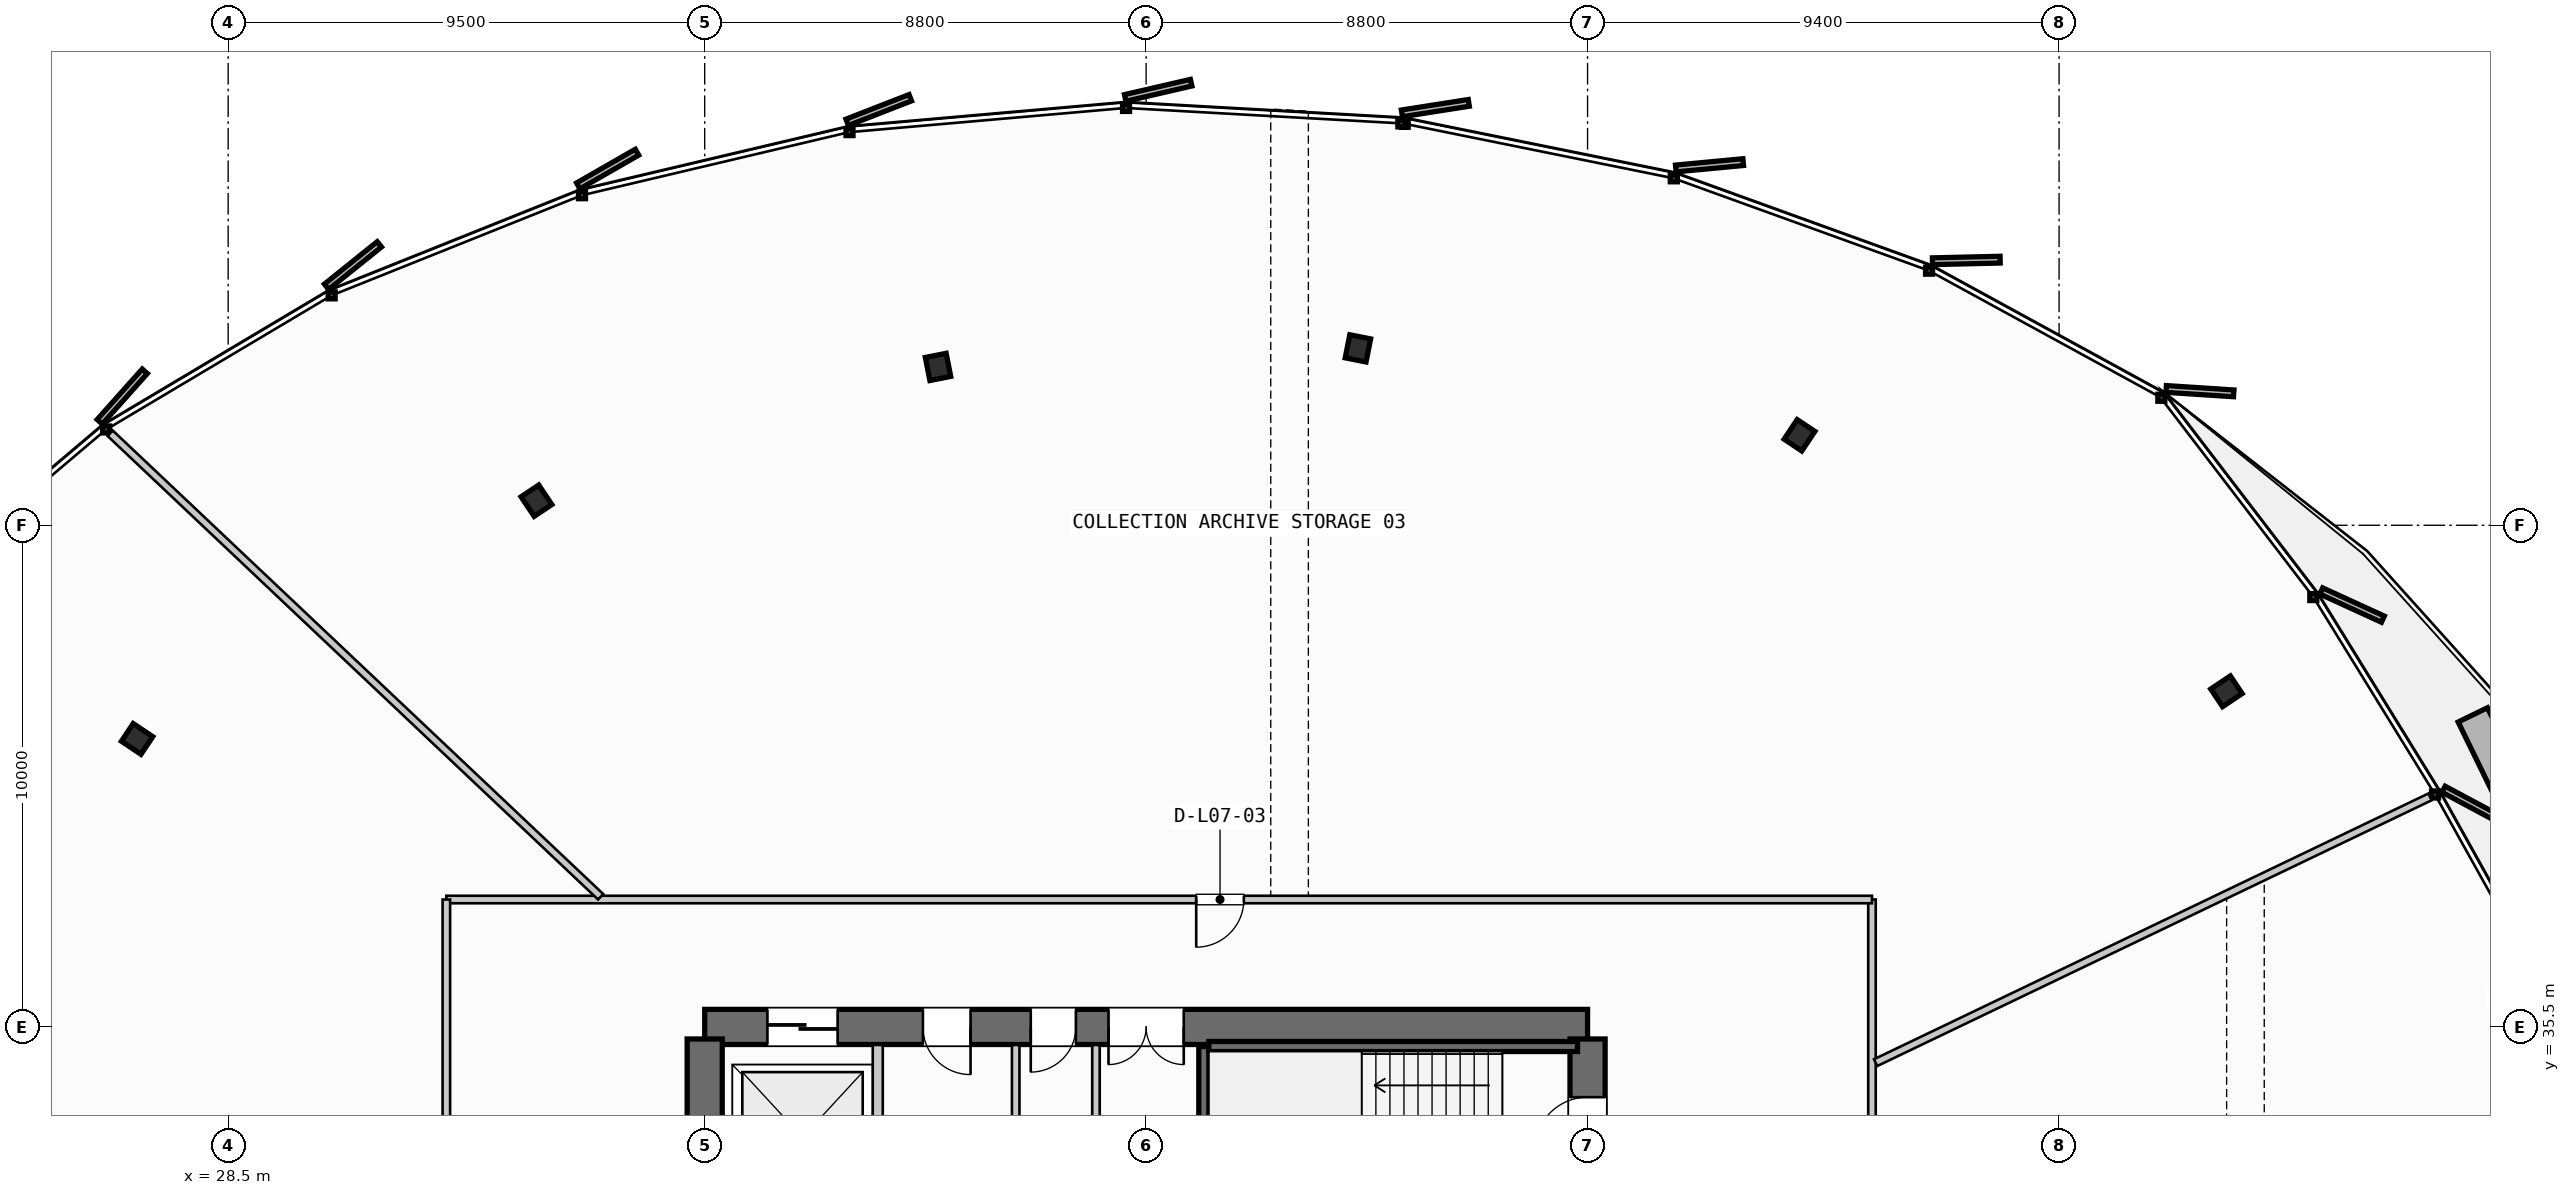
"""IFC4 building model, lengths in metres.
Left out: names, types, materials, properties, quantities, classifications, styles, units other than length and angle.
Written with IfcOpenShell. Run it as: python <this file> out.ifc"""

import sys

from ifc_helpers import new_model, si_unit, direction, frame, frame_2d, origin, origin_2d, place, context, subcontext, project, spatial, rectangle, i_section, extrude, source, transform, mapped, element, fill, save


model = new_model("IFC4")
c1 = context("Model", 3, precision=1e-05, world=origin(), true_north=direction((0.0, 1.0)))
c2 = subcontext(c1, "Body", "Model", "MODEL_VIEW")
j1 = project(units=[si_unit("LENGTHUNIT", "METRE"), si_unit("PLANEANGLEUNIT", "RADIAN")], contexts=[c1])
p1 = place(None, origin())
s1 = spatial("IfcSite", under=j1, at=p1, CompositionType="ELEMENT")
p2 = place(p1, origin())
s2 = spatial("IfcBuilding", under=s1, at=p2, CompositionType="ELEMENT")
p3 = place(p2, frame((0.0, 0.0, 33.4)))
s3 = spatial("IfcBuildingStorey", under=s2, at=p3, CompositionType="ELEMENT", Elevation=33.4)
p4 = place(p3, frame((55.6, 35.5, 0.0), z_axis=(0.0, 0.0, 1.0), x_axis=(-1.0, 0.0, 0.0)))
e1 = element("IfcWall", 1, at=p4, inside=s3, PredefinedType="SHEAR", context=c2, shape_type="SweptSolid", body=[
    extrude(rectangle(XDim=17.6, YDim=0.7, at=frame_2d((8.8, 0.0))), origin(), (0.0, 0.0, 1.0), 3.55),
])
p5 = place(p4, frame((8.05, 0.0, 0.0)))
e2 = element("IfcOpeningElement", 2, at=p5, cuts=e1, PredefinedType="OPENING", context=c2, shape_type="SweptSolid", body=[
    extrude(rectangle(XDim=1.5, YDim=2.2, at=frame_2d((0.75, 1.1))), frame((0.0, 0.36, 0.0), z_axis=(0.0, -1.0, 0.0), x_axis=(1.0, 0.0, 0.0)), (0.0, 0.0, 1.0), 0.72),
])
p6 = place(p4, frame((14.95, 0.0, 0.0)))
e3 = element("IfcOpeningElement", 3, at=p6, cuts=e1, PredefinedType="OPENING", context=c2, shape_type="SweptSolid", body=[
    extrude(rectangle(XDim=1.4, YDim=2.3, at=frame_2d((0.7, 1.15))), frame((0.0, 0.36, 0.0), z_axis=(0.0, -1.0, 0.0), x_axis=(1.0, 0.0, 0.0)), (0.0, 0.0, 1.0), 0.72),
])
p7 = place(p4, frame((12.3, 0.0, 0.0)))
e4 = element("IfcOpeningElement", 4, at=p7, cuts=e1, PredefinedType="OPENING", context=c2, shape_type="SweptSolid", body=[
    extrude(rectangle(XDim=0.95, YDim=2.15, at=frame_2d((0.475, 1.075))), frame((0.0, 0.36, 0.0), z_axis=(0.0, -1.0, 0.0), x_axis=(1.0, 0.0, 0.0)), (0.0, 0.0, 1.0), 0.72),
])
p8 = place(p4, frame((10.2, 0.0, 0.0)))
e5 = element("IfcOpeningElement", 5, at=p8, cuts=e1, PredefinedType="OPENING", context=c2, shape_type="SweptSolid", body=[
    extrude(rectangle(XDim=0.9, YDim=2.15, at=frame_2d((0.45, 1.075))), frame((0.0, 0.36, 0.0), z_axis=(0.0, -1.0, 0.0), x_axis=(1.0, 0.0, 0.0)), (0.0, 0.0, 1.0), 0.72),
])
p9 = place(p3, frame((38.0, 35.26, 0.0), z_axis=(0.0, 0.0, 1.0), x_axis=(0.0, -1.0, 0.0)))
e6 = element("IfcWall", 6, at=p9, inside=s3, PredefinedType="SHEAR", context=c2, shape_type="SweptSolid", body=[
    extrude(rectangle(XDim=14.92, YDim=0.7, at=frame_2d((7.46, 0.0))), origin(), (0.0, 0.0, 1.0), 3.55),
])
p10 = place(p9, frame((5.21, 0.0, 0.0)))
e7 = element("IfcOpeningElement", 7, at=p10, cuts=e6, PredefinedType="OPENING", context=c2, shape_type="SweptSolid", body=[
    extrude(rectangle(XDim=1.1, YDim=2.2, at=frame_2d((0.55, 1.1))), frame((0.0, 0.36, 0.0), z_axis=(0.0, -1.0, 0.0), x_axis=(1.0, 0.0, 0.0)), (0.0, 0.0, 1.0), 0.72),
])
p11 = place(p3, frame((55.6, 20.34, 0.0), z_axis=(0.0, 0.0, 1.0), x_axis=(0.0, 1.0, 0.0)))
e8 = element("IfcWall", 8, at=p11, inside=s3, PredefinedType="SHEAR", context=c2, shape_type="SweptSolid", body=[
    extrude(rectangle(XDim=14.92, YDim=0.7, at=frame_2d((7.46, 0.0))), origin(), (0.0, 0.0, 1.0), 3.55),
])
p12 = place(p11, frame((12.71, 0.0, 0.0)))
e9 = element("IfcOpeningElement", 9, at=p12, cuts=e8, PredefinedType="OPENING", context=c2, shape_type="SweptSolid", body=[
    extrude(rectangle(XDim=1.05, YDim=2.15, at=frame_2d((0.525, 1.075))), frame((0.0, 0.36, 0.0), z_axis=(0.0, -1.0, 0.0), x_axis=(1.0, 0.0, 0.0)), (0.0, 0.0, 1.0), 0.72),
])
p13 = place(p11, frame((8.61, 0.0, 0.0)))
e10 = element("IfcOpeningElement", 10, at=p13, cuts=e8, PredefinedType="OPENING", context=c2, shape_type="SweptSolid", body=[
    extrude(rectangle(XDim=1.1, YDim=2.2, at=frame_2d((0.55, 1.1))), frame((0.0, 0.36, 0.0), z_axis=(0.0, -1.0, 0.0), x_axis=(1.0, 0.0, 0.0)), (0.0, 0.0, 1.0), 0.72),
])
m1 = source(origin(), c2, "Body", "SweptSolid", [
    extrude(i_section(OverallWidth=0.423, OverallDepth=0.469, WebThickness=0.051, FlangeThickness=0.081, FilletRadius=0.015, at=origin_2d()), origin(), (0.0, 0.0, 1.0), 3.55),
])
for number, where, z_axis, x_axis in (
    (11, (68.336, 42.19, 0.0), (0.0, 0.0, 1.0), (0.831, 0.556, 0.0)),
    (12, (59.825, 47.293, 0.0), (0.0, 0.0, 1.0), (0.556, 0.831, 0.0)),
    (13, (51.022, 49.026, 0.0), (0.0, 0.0, 1.0), (0.195, 0.981, 0.0)),
    (14, (42.652, 48.656, 0.0), (0.0, 0.0, 1.0), (-0.195, 0.981, 0.0)),
    (15, (34.646, 45.99, 0.0), (0.0, 0.0, 1.0), (-0.556, 0.831, 0.0)),
    (16, (26.685, 41.241, 0.0), (0.0, 0.0, 1.0), (-0.831, 0.556, 0.0)),
):
    element("IfcColumn", number, at=place(p3, frame(where, z_axis=z_axis, x_axis=x_axis)), inside=s3, PredefinedType="COLUMN", context=c2, shape_type="MappedRepresentation", body=[
        mapped(m1, transform((0.0, 0.0, 0.0), scale=1.0)),
    ])
p14 = place(p3, frame((47.95, 32.05, 0.0), z_axis=(0.0, 0.0, 1.0), x_axis=(0.0, 1.0, 0.0)))
e17 = element("IfcWall", 17, at=p14, inside=s3, PredefinedType="SHEAR", context=c2, shape_type="SweptSolid", body=[
    extrude(rectangle(XDim=3.06, YDim=0.2, at=frame_2d((1.53, 0.0))), origin(), (0.0, 0.0, 1.0), 3.55),
])
p15 = place(p3, frame((48.05, 35.11, 0.0), z_axis=(0.0, 0.0, 1.0), x_axis=(1.0, 0.0, 0.0)))
e18 = element("IfcWall", 18, at=p15, inside=s3, PredefinedType="SHEAR", context=c2, shape_type="SweptSolid", body=[
    extrude(rectangle(XDim=7.35, YDim=0.2, at=frame_2d((3.675, 0.0))), origin(), (0.0, 0.0, 1.0), 3.55),
])
p16 = place(p3, frame((41.45, 31.85, 0.0), z_axis=(0.0, 0.0, 1.0), x_axis=(0.0, 1.0, 0.0)))
e19 = element("IfcWall", 19, at=p16, inside=s3, PredefinedType="PARTITIONING", context=c2, shape_type="SweptSolid", body=[
    extrude(rectangle(XDim=3.29, YDim=0.2, at=frame_2d((1.645, 0.0))), origin(), (0.0, 0.0, 1.0), 2.925),
])
p17 = place(p3, frame((45.8, 31.85, 0.0), z_axis=(0.0, 0.0, 1.0), x_axis=(0.0, 1.0, 0.0)))
e20 = element("IfcWall", 20, at=p17, inside=s3, PredefinedType="PARTITIONING", context=c2, shape_type="SweptSolid", body=[
    extrude(rectangle(XDim=3.29, YDim=0.15, at=frame_2d((1.645, 0.0))), origin(), (0.0, 0.0, 1.0), 2.925),
])
p18 = place(p3, frame((44.2, 31.85, 0.0), z_axis=(0.0, 0.0, 1.0), x_axis=(0.0, 1.0, 0.0)))
e21 = element("IfcWall", 21, at=p18, inside=s3, PredefinedType="PLUMBINGWALL", context=c2, shape_type="SweptSolid", body=[
    extrude(rectangle(XDim=3.29, YDim=0.15, at=frame_2d((1.645, 0.0))), origin(), (0.0, 0.0, 1.0), 2.925),
])
p19 = place(p3, frame((61.27, 17.98, 0.0), z_axis=(0.0, 0.0, 1.0), x_axis=(0.0, 1.0, 0.0)))
e22 = element("IfcWall", 22, at=p19, inside=s3, PredefinedType="PARTITIONING", context=c2, shape_type="SweptSolid", body=[
    extrude(rectangle(XDim=20.06, YDim=0.15, at=frame_2d((10.03, 0.0))), origin(), (0.0, 0.0, 1.0), 2.925),
])
p20 = place(p19, frame((8.217, 0.0, 0.0)))
e23 = element("IfcOpeningElement", 23, at=p20, cuts=e22, PredefinedType="OPENING", context=c2, shape_type="SweptSolid", body=[
    extrude(rectangle(XDim=0.95, YDim=2.15, at=frame_2d((0.475, 1.075))), frame((0.0, 0.085, 0.0), z_axis=(0.0, -1.0, 0.0), x_axis=(1.0, 0.0, 0.0)), (0.0, 0.0, 1.0), 0.17),
])
p21 = place(p3, frame((61.27, 38.04, 0.0), z_axis=(0.0, 0.0, 1.0), x_axis=(-1.0, 0.0, 0.0)))
e24 = element("IfcWall", 24, at=p21, inside=s3, PredefinedType="PARTITIONING", context=c2, shape_type="SweptSolid", body=[
    extrude(rectangle(XDim=28.42, YDim=0.15, at=frame_2d((14.21, 0.0))), origin(), (0.0, 0.0, 1.0), 2.925),
])
p22 = place(p21, frame((12.522, 0.0, 0.0)))
e25 = element("IfcOpeningElement", 25, at=p22, cuts=e24, PredefinedType="OPENING", context=c2, shape_type="SweptSolid", body=[
    extrude(rectangle(XDim=0.95, YDim=2.15, at=frame_2d((0.475, 1.075))), frame((0.0, 0.085, 0.0), z_axis=(0.0, -1.0, 0.0), x_axis=(1.0, 0.0, 0.0)), (0.0, 0.0, 1.0), 0.17),
])
p23 = place(p3, frame((32.85, 38.04, 0.0), z_axis=(0.0, 0.0, 1.0), x_axis=(0.0, -1.0, 0.0)))
e26 = element("IfcWall", 26, at=p23, inside=s3, PredefinedType="PARTITIONING", context=c2, shape_type="SweptSolid", body=[
    extrude(rectangle(XDim=20.06, YDim=0.15, at=frame_2d((10.03, 0.0))), origin(), (0.0, 0.0, 1.0), 2.925),
])
p24 = place(p23, frame((8.387, 0.0, 0.0)))
e27 = element("IfcOpeningElement", 27, at=p24, cuts=e26, PredefinedType="OPENING", context=c2, shape_type="SweptSolid", body=[
    extrude(rectangle(XDim=0.95, YDim=2.15, at=frame_2d((0.475, 1.075))), frame((0.0, 0.085, 0.0), z_axis=(0.0, -1.0, 0.0), x_axis=(1.0, 0.0, 0.0)), (0.0, 0.0, 1.0), 0.17),
])
p25 = place(p3, frame((61.342, 34.788, 0.0), z_axis=(0.0, 0.0, 1.0), x_axis=(0.901775597837, 0.432204547808, 0.0)))
e28 = element("IfcWall", 28, at=p25, inside=s3, PredefinedType="PARTITIONING", context=c2, shape_type="SweptSolid", body=[
    extrude(rectangle(XDim=12.257, YDim=0.15, at=frame_2d((6.128, 0.0))), origin(), (0.0, 0.0, 1.0), 2.925),
])
p26 = place(p3, frame((35.926, 38.095, 0.0), z_axis=(0.0, 0.0, 1.0), x_axis=(-0.726850560668, 0.686795648251, 0.0)))
e29 = element("IfcWall", 29, at=p26, inside=s3, PredefinedType="PARTITIONING", context=c2, shape_type="SweptSolid", body=[
    extrude(rectangle(XDim=13.452, YDim=0.15, at=frame_2d((6.726, 0.0))), origin(), (0.0, 0.0, 1.0), 2.925),
])
m2 = source(origin(), c2, "Body", "SweptSolid", [
    extrude(rectangle(XDim=1.05, YDim=2.15, at=frame_2d((0.525, 1.075))), frame((0.0, 0.025, 0.0), z_axis=(0.0, -1.0, 0.0), x_axis=(1.0, 0.0, 0.0)), (0.0, 0.0, 1.0), 0.05),
])
p27 = place(p12, origin())
e30 = element("IfcDoor", 30, at=p27, inside=s3, OperationType="SINGLE_SWING_LEFT", PredefinedType="DOOR", context=c2, shape_type="MappedRepresentation", body=[
    mapped(m2, transform((0.0, 0.0, 0.0), scale=1.0)),
])
fill(e9, e30)
m3 = source(origin(), c2, "Body", "SweptSolid", [
    extrude(rectangle(XDim=1.5, YDim=2.2, at=frame_2d((0.75, 1.1))), frame((0.0, 0.025, 0.0), z_axis=(0.0, -1.0, 0.0), x_axis=(1.0, 0.0, 0.0)), (0.0, 0.0, 1.0), 0.05),
])
p28 = place(p5, origin())
e31 = element("IfcDoor", 31, at=p28, inside=s3, OperationType="DOUBLE_DOOR_SINGLE_SWING", PredefinedType="DOOR", context=c2, shape_type="MappedRepresentation", body=[
    mapped(m3, transform((0.0, 0.0, 0.0), scale=1.0)),
])
fill(e2, e31)
m4 = source(origin(), c2, "Body", "SweptSolid", [
    extrude(rectangle(XDim=1.4, YDim=2.3, at=frame_2d((0.7, 1.15))), frame((0.0, 0.025, 0.0), z_axis=(0.0, -1.0, 0.0), x_axis=(1.0, 0.0, 0.0)), (0.0, 0.0, 1.0), 0.05),
])
p29 = place(p6, origin())
e32 = element("IfcDoor", 32, at=p29, inside=s3, OperationType="SLIDING_TO_RIGHT", PredefinedType="DOOR", context=c2, shape_type="MappedRepresentation", body=[
    mapped(m4, transform((0.0, 0.0, 0.0), scale=1.0)),
])
fill(e3, e32)
m5 = source(origin(), c2, "Body", "SweptSolid", [
    extrude(rectangle(XDim=0.95, YDim=2.15, at=frame_2d((0.475, 1.075))), frame((0.0, 0.025, 0.0), z_axis=(0.0, -1.0, 0.0), x_axis=(1.0, 0.0, 0.0)), (0.0, 0.0, 1.0), 0.05),
])
p30 = place(p7, origin())
e33 = element("IfcDoor", 33, at=p30, inside=s3, OperationType="SINGLE_SWING_LEFT", PredefinedType="DOOR", context=c2, shape_type="MappedRepresentation", body=[
    mapped(m5, transform((0.0, 0.0, 0.0), scale=1.0)),
])
fill(e4, e33)
m6 = source(origin(), c2, "Body", "SweptSolid", [
    extrude(rectangle(XDim=0.9, YDim=2.15, at=frame_2d((0.45, 1.075))), frame((0.0, 0.025, 0.0), z_axis=(0.0, -1.0, 0.0), x_axis=(1.0, 0.0, 0.0)), (0.0, 0.0, 1.0), 0.05),
])
p31 = place(p8, origin())
e34 = element("IfcDoor", 34, at=p31, inside=s3, OperationType="SINGLE_SWING_RIGHT", PredefinedType="DOOR", context=c2, shape_type="MappedRepresentation", body=[
    mapped(m6, transform((0.0, 0.0, 0.0), scale=1.0)),
])
fill(e5, e34)
p32 = place(p22, origin())
e35 = element("IfcDoor", 35, at=p32, inside=s3, OperationType="SINGLE_SWING_RIGHT", PredefinedType="DOOR", context=c2, shape_type="MappedRepresentation", body=[
    mapped(m5, transform((0.0, 0.0, 0.0), scale=1.0)),
])
fill(e25, e35)
save(model, sys.argv[1])
